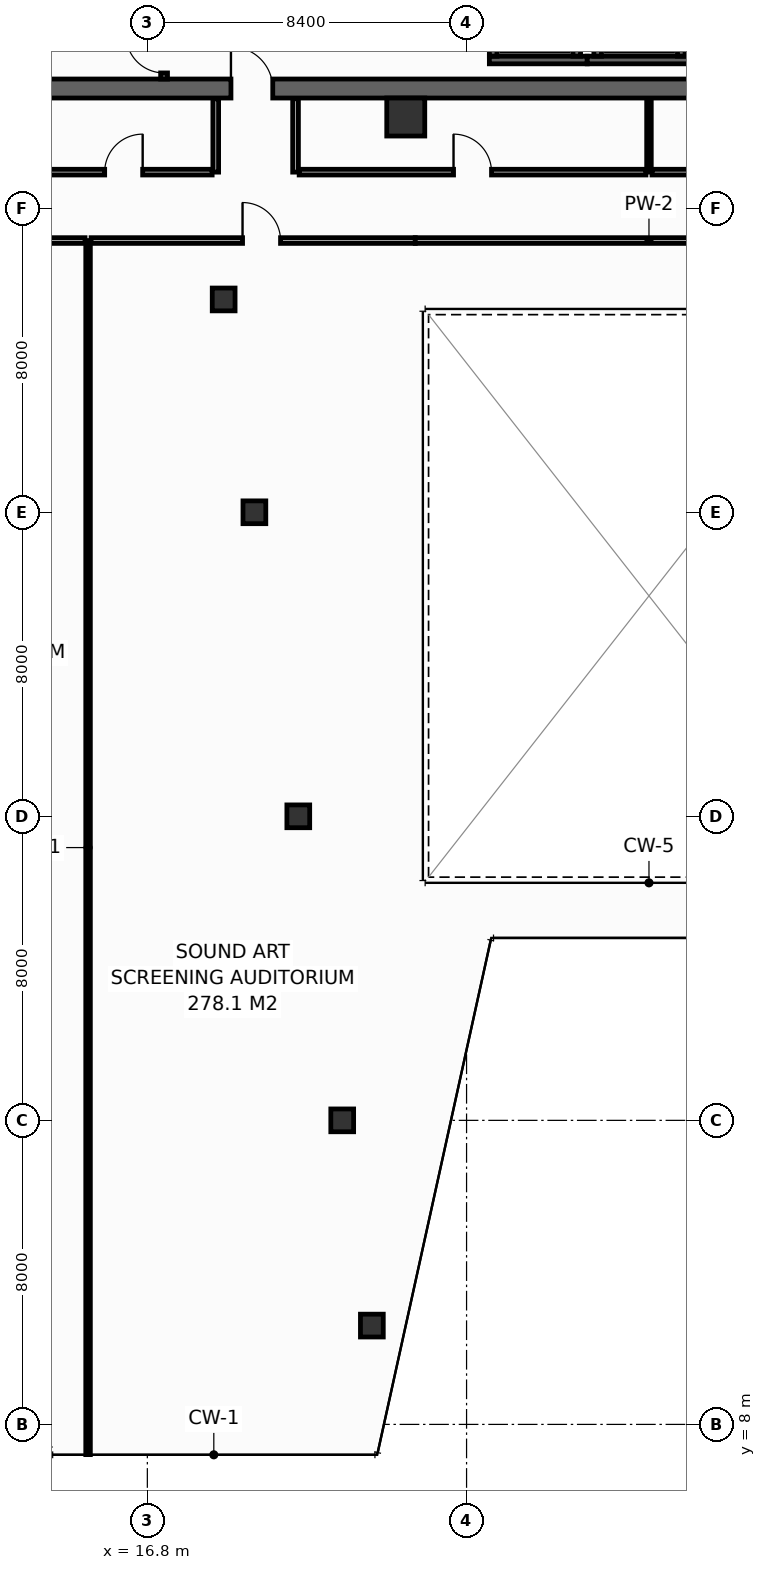
"""IFC4 building model, lengths in metres.
Left out: names, types, materials, properties, quantities, classifications, styles, units other than length and angle.
Written with IfcOpenShell. Run it as: python <this file> out.ifc"""

import sys

from ifc_helpers import new_model, si_unit, direction, frame, frame_2d, origin, origin_2d, place, context, subcontext, project, spatial, rectangle, hollow_rectangle, extrude, element, fill, save


model = new_model("IFC4")
c1 = context("Model", 3, precision=1e-05, world=origin(), true_north=direction((0.0, 1.0)))
c2 = subcontext(c1, "Body", "Model", "MODEL_VIEW")
j1 = project(units=[si_unit("LENGTHUNIT", "METRE"), si_unit("PLANEANGLEUNIT", "RADIAN")], contexts=[c1])
p1 = place(None, origin())
s1 = spatial("IfcSite", under=j1, at=p1, CompositionType="ELEMENT")
p2 = place(p1, origin())
s2 = spatial("IfcBuilding", under=s1, at=p2, CompositionType="ELEMENT")
p3 = place(p2, frame((0.0, 0.0, 141.0)))
s3 = spatial("IfcBuildingStorey", under=s2, at=p3, CompositionType="ELEMENT", Elevation=141.0)
p4 = place(p3, frame((13.6, 43.15, 0.0), z_axis=(0.0, 0.0, 1.0), x_axis=(1.0, 0.0, 0.0)))
e1 = element("IfcWall", 1, at=p4, inside=s3, PredefinedType="SHEAR", context=c2, shape_type="SweptSolid", body=[
    extrude(rectangle(XDim=32.7, YDim=0.5, at=frame_2d((16.35, 0.0))), origin(), (0.0, 0.0, 1.0), 3.55),
])
p5 = place(p4, frame((5.4, 0.0, 0.0)))
e2 = element("IfcOpeningElement", 2, at=p5, cuts=e1, PredefinedType="OPENING", context=c2, shape_type="SweptSolid", body=[
    extrude(rectangle(XDim=1.1, YDim=2.15, at=frame_2d((0.55, 1.075))), frame((0.0, 0.26, 0.0), z_axis=(0.0, -1.0, 0.0), x_axis=(1.0, 0.0, 0.0)), (0.0, 0.0, 1.0), 0.52),
])
p6 = place(p4, frame((25.6, 0.0, 0.0)))
e3 = element("IfcOpeningElement", 3, at=p6, cuts=e1, PredefinedType="OPENING", context=c2, shape_type="SweptSolid", body=[
    extrude(rectangle(XDim=1.1, YDim=2.15, at=frame_2d((0.55, 1.075))), frame((0.0, 0.26, 0.0), z_axis=(0.0, -1.0, 0.0), x_axis=(1.0, 0.0, 0.0)), (0.0, 0.0, 1.0), 0.52),
])
p7 = place(p3, frame((23.6, 42.4, 0.0), z_axis=(0.0, 0.0, 1.0), x_axis=(1.0, 0.0, 0.0)))
e4 = element("IfcColumn", 4, at=p7, inside=s3, PredefinedType="COLUMN", context=c2, shape_type="SweptSolid", body=[
    extrude(hollow_rectangle(XDim=1.0, YDim=1.0, WallThickness=0.045, at=origin_2d()), origin(), (0.0, 0.0, 1.0), 3.8),
])
for number, where, z_axis, x_axis in (
    (5, (22.708, 10.6, 0.0), (0.0, 0.0, 1.0), (1.0, 0.0, 0.0)),
    (6, (21.928, 16.0, 0.0), (0.0, 0.0, 1.0), (1.0, 0.0, 0.0)),
    (7, (20.772, 24.0, 0.0), (0.0, 0.0, 1.0), (1.0, 0.0, 0.0)),
    (8, (19.617, 32.0, 0.0), (0.0, 0.0, 1.0), (1.0, 0.0, 0.0)),
    (9, (18.808, 37.6, 0.0), (0.0, 0.0, 1.0), (1.0, 0.0, 0.0)),
):
    element("IfcColumn", number, at=place(p3, frame(where, z_axis=z_axis, x_axis=x_axis)), inside=s3, PredefinedType="COLUMN", context=c2, shape_type="SweptSolid", body=[
        extrude(hollow_rectangle(XDim=0.6, YDim=0.6, WallThickness=0.028, at=origin_2d()), origin(), (0.0, 0.0, 1.0), 3.8),
    ])
p8 = place(p3, frame((25.8, 43.9, 0.0), z_axis=(0.0, 0.0, 1.0), x_axis=(1.0, 0.0, 0.0)))
e10 = element("IfcWall", 10, at=p8, inside=s3, PredefinedType="SHEAR", context=c2, shape_type="SweptSolid", body=[
    extrude(rectangle(XDim=2.575, YDim=0.2, at=frame_2d((1.288, 0.0))), origin(), (0.0, 0.0, 1.0), 3.55),
])
for number, where, z_axis, x_axis in (
    (11, (25.9, 44.0, 0.0), (0.0, 0.0, 1.0), (0.0, 1.0, 0.0)),
    (12, (28.1, 44.0, 0.0), (0.0, 0.0, 1.0), (0.0, 1.0, 0.0)),
):
    element("IfcWall", number, at=place(p3, frame(where, z_axis=z_axis, x_axis=x_axis)), inside=s3, PredefinedType="SHEAR", context=c2, shape_type="SweptSolid", body=[
        extrude(rectangle(XDim=2.3, YDim=0.2, at=frame_2d((1.15, 0.0))), origin(), (0.0, 0.0, 1.0), 3.55),
    ])
p9 = place(p3, frame((28.375, 43.9, 0.0), z_axis=(0.0, 0.0, 1.0), x_axis=(1.0, 0.0, 0.0)))
e13 = element("IfcWall", 13, at=p9, inside=s3, PredefinedType="SHEAR", context=c2, shape_type="SweptSolid", body=[
    extrude(rectangle(XDim=2.75, YDim=0.2, at=frame_2d((1.375, 0.0))), origin(), (0.0, 0.0, 1.0), 3.55),
])
for number, where, z_axis, x_axis in (
    (14, (28.65, 44.0, 0.0), (0.0, 0.0, 1.0), (0.0, 1.0, 0.0)),
    (15, (30.85, 44.0, 0.0), (0.0, 0.0, 1.0), (0.0, 1.0, 0.0)),
):
    element("IfcWall", number, at=place(p3, frame(where, z_axis=z_axis, x_axis=x_axis)), inside=s3, PredefinedType="SHEAR", context=c2, shape_type="SweptSolid", body=[
        extrude(rectangle(XDim=2.3, YDim=0.2, at=frame_2d((1.15, 0.0))), origin(), (0.0, 0.0, 1.0), 3.55),
    ])
p10 = place(p3, frame((17.24, 43.4, 0.0), z_axis=(0.0, 0.0, 1.0), x_axis=(0.0, 1.0, 0.0)))
e16 = element("IfcWall", 16, at=p10, inside=s3, PredefinedType="SHEAR", context=c2, shape_type="SweptSolid", body=[
    extrude(rectangle(XDim=10.4, YDim=0.18, at=frame_2d((5.2, 0.0))), origin(), (0.0, 0.0, 1.0), 3.55),
])
p11 = place(p10, frame((0.16, 0.0, 0.0)))
e17 = element("IfcOpeningElement", 17, at=p11, cuts=e16, PredefinedType="OPENING", context=c2, shape_type="SweptSolid", body=[
    extrude(rectangle(XDim=1.0, YDim=2.15, at=frame_2d((0.5, 1.075))), frame((0.0, 0.1, 0.0), z_axis=(0.0, -1.0, 0.0), x_axis=(1.0, 0.0, 0.0)), (0.0, 0.0, 1.0), 0.2),
])
for number, where, z_axis, x_axis in (
    (18, (18.6, 40.95, 0.0), (0.0, 0.0, 1.0), (0.0, 1.0, 0.0)),
    (19, (20.7, 40.95, 0.0), (0.0, 0.0, 1.0), (0.0, 1.0, 0.0)),
):
    element("IfcWall", number, at=place(p3, frame(where, z_axis=z_axis, x_axis=x_axis)), inside=s3, PredefinedType="PARTITIONING", context=c2, shape_type="SweptSolid", body=[
        extrude(rectangle(XDim=1.93, YDim=0.15, at=frame_2d((0.965, 0.0))), origin(), (0.0, 0.0, 1.0), 3.55),
    ])
p12 = place(p3, frame((13.85, 40.95, 0.0), z_axis=(0.0, 0.0, 1.0), x_axis=(1.0, 0.0, 0.0)))
e20 = element("IfcWall", 20, at=p12, inside=s3, PredefinedType="PARTITIONING", context=c2, shape_type="SweptSolid", body=[
    extrude(rectangle(XDim=4.655, YDim=0.15, at=frame_2d((2.327, 0.0))), origin(), (0.0, 0.0, 1.0), 3.55),
])
p13 = place(p12, frame((1.827, 0.0, 0.0)))
e21 = element("IfcOpeningElement", 21, at=p13, cuts=e20, PredefinedType="OPENING", context=c2, shape_type="SweptSolid", body=[
    extrude(rectangle(XDim=1.0, YDim=2.15, at=frame_2d((0.5, 1.075))), frame((0.0, 0.085, 0.0), z_axis=(0.0, -1.0, 0.0), x_axis=(1.0, 0.0, 0.0)), (0.0, 0.0, 1.0), 0.17),
])
p14 = place(p3, frame((30.0, 40.95, 0.0), z_axis=(0.0, 0.0, 1.0), x_axis=(0.0, 1.0, 0.0)))
e22 = element("IfcWall", 22, at=p14, inside=s3, PredefinedType="PARTITIONING", context=c2, shape_type="SweptSolid", body=[
    extrude(rectangle(XDim=1.93, YDim=0.12, at=frame_2d((0.965, 0.0))), origin(), (0.0, 0.0, 1.0), 2.835),
])
p15 = place(p3, frame((20.795, 40.95, 0.0), z_axis=(0.0, 0.0, 1.0), x_axis=(1.0, 0.0, 0.0)))
e23 = element("IfcWall", 23, at=p15, inside=s3, PredefinedType="PARTITIONING", context=c2, shape_type="SweptSolid", body=[
    extrude(rectangle(XDim=9.125, YDim=0.15, at=frame_2d((4.562, 0.0))), origin(), (0.0, 0.0, 1.0), 2.835),
])
p16 = place(p15, frame((4.062, 0.0, 0.0)))
e24 = element("IfcOpeningElement", 24, at=p16, cuts=e23, PredefinedType="OPENING", context=c2, shape_type="SweptSolid", body=[
    extrude(rectangle(XDim=1.0, YDim=2.15, at=frame_2d((0.5, 1.075))), frame((0.0, 0.085, 0.0), z_axis=(0.0, -1.0, 0.0), x_axis=(1.0, 0.0, 0.0)), (0.0, 0.0, 1.0), 0.17),
])
p17 = place(p3, frame((30.08, 40.95, 0.0), z_axis=(0.0, 0.0, 1.0), x_axis=(1.0, 0.0, 0.0)))
e25 = element("IfcWall", 25, at=p17, inside=s3, PredefinedType="PARTITIONING", context=c2, shape_type="SweptSolid", body=[
    extrude(rectangle(XDim=8.625, YDim=0.15, at=frame_2d((4.312, 0.0))), origin(), (0.0, 0.0, 1.0), 2.835),
])
p18 = place(p17, frame((3.788, 0.0, 0.0)))
e26 = element("IfcOpeningElement", 26, at=p18, cuts=e25, PredefinedType="OPENING", context=c2, shape_type="SweptSolid", body=[
    extrude(rectangle(XDim=1.05, YDim=2.15, at=frame_2d((0.525, 1.075))), frame((0.0, 0.085, 0.0), z_axis=(0.0, -1.0, 0.0), x_axis=(1.0, 0.0, 0.0)), (0.0, 0.0, 1.0), 0.17),
])
p19 = place(p3, frame((15.24, 7.205, 0.0), z_axis=(0.0, 0.0, 1.0), x_axis=(0.0, 1.0, 0.0)))
e27 = element("IfcWall", 27, at=p19, inside=s3, PredefinedType="PARTITIONING", context=c2, shape_type="SweptSolid", body=[
    extrude(rectangle(XDim=31.945, YDim=0.12, at=frame_2d((15.972, 0.0))), origin(), (0.0, 0.0, 1.0), 2.835),
])
p20 = place(p3, frame((6.334, 39.15, 0.0), z_axis=(0.0, 0.0, 1.0), x_axis=(1.0, 0.0, 0.0)))
e28 = element("IfcWall", 28, at=p20, inside=s3, PredefinedType="PARTITIONING", context=c2, shape_type="SweptSolid", body=[
    extrude(rectangle(XDim=8.826, YDim=0.15, at=frame_2d((4.413, 0.0))), origin(), (0.0, 0.0, 1.0), 3.035),
])
p21 = place(p20, frame((3.913, 0.0, 0.0)))
e29 = element("IfcOpeningElement", 29, at=p21, cuts=e28, PredefinedType="OPENING", context=c2, shape_type="SweptSolid", body=[
    extrude(rectangle(XDim=1.0, YDim=2.15, at=frame_2d((0.5, 1.075))), frame((0.0, 0.085, 0.0), z_axis=(0.0, -1.0, 0.0), x_axis=(1.0, 0.0, 0.0)), (0.0, 0.0, 1.0), 0.17),
])
p22 = place(p3, frame((15.32, 39.15, 0.0), z_axis=(0.0, 0.0, 1.0), x_axis=(1.0, 0.0, 0.0)))
e30 = element("IfcWall", 30, at=p22, inside=s3, PredefinedType="PARTITIONING", context=c2, shape_type="SweptSolid", body=[
    extrude(rectangle(XDim=8.53, YDim=0.15, at=frame_2d((4.265, 0.0))), origin(), (0.0, 0.0, 1.0), 2.835),
])
p23 = place(p22, frame((3.985, 0.0, 0.0)))
e31 = element("IfcOpeningElement", 31, at=p23, cuts=e30, PredefinedType="OPENING", context=c2, shape_type="SweptSolid", body=[
    extrude(rectangle(XDim=1.0, YDim=2.15, at=frame_2d((0.5, 1.075))), frame((0.0, 0.085, 0.0), z_axis=(0.0, -1.0, 0.0), x_axis=(1.0, 0.0, 0.0)), (0.0, 0.0, 1.0), 0.17),
])
p24 = place(p3, frame((23.85, 39.15, 0.0), z_axis=(0.0, 0.0, 1.0), x_axis=(1.0, 0.0, 0.0)))
e32 = element("IfcWall", 32, at=p24, inside=s3, PredefinedType="PARTITIONING", context=c2, shape_type="SweptSolid", body=[
    extrude(rectangle(XDim=12.3, YDim=0.15, at=frame_2d((6.15, 0.0))), origin(), (0.0, 0.0, 1.0), 3.55),
])
p25 = place(p11, origin())
e33 = element("IfcDoor", 33, at=p25, inside=s3, OperationType="SINGLE_SWING_RIGHT", PredefinedType="DOOR", context=c2, shape_type="SweptSolid", body=[
    extrude(rectangle(XDim=1.0, YDim=2.15, at=frame_2d((0.5, 1.075))), frame((0.0, 0.025, 0.0), z_axis=(0.0, -1.0, 0.0), x_axis=(1.0, 0.0, 0.0)), (0.0, 0.0, 1.0), 0.05),
])
fill(e17, e33)
p26 = place(p5, origin())
e34 = element("IfcDoor", 34, at=p26, inside=s3, OperationType="SINGLE_SWING_LEFT", PredefinedType="DOOR", context=c2, shape_type="SweptSolid", body=[
    extrude(rectangle(XDim=1.1, YDim=2.15, at=frame_2d((0.55, 1.075))), frame((0.0, 0.025, 0.0), z_axis=(0.0, -1.0, 0.0), x_axis=(1.0, 0.0, 0.0)), (0.0, 0.0, 1.0), 0.05),
])
fill(e2, e34)
p27 = place(p13, origin())
e35 = element("IfcDoor", 35, at=p27, inside=s3, OperationType="SINGLE_SWING_RIGHT", PredefinedType="DOOR", context=c2, shape_type="SweptSolid", body=[
    extrude(rectangle(XDim=1.0, YDim=2.15, at=frame_2d((0.5, 1.075))), frame((0.0, 0.025, 0.0), z_axis=(0.0, -1.0, 0.0), x_axis=(1.0, 0.0, 0.0)), (0.0, 0.0, 1.0), 0.05),
])
fill(e21, e35)
p28 = place(p16, origin())
e36 = element("IfcDoor", 36, at=p28, inside=s3, OperationType="SINGLE_SWING_LEFT", PredefinedType="DOOR", context=c2, shape_type="SweptSolid", body=[
    extrude(rectangle(XDim=1.0, YDim=2.15, at=frame_2d((0.5, 1.075))), frame((0.0, 0.025, 0.0), z_axis=(0.0, -1.0, 0.0), x_axis=(1.0, 0.0, 0.0)), (0.0, 0.0, 1.0), 0.05),
])
fill(e24, e36)
p29 = place(p23, origin())
e37 = element("IfcDoor", 37, at=p29, inside=s3, OperationType="SINGLE_SWING_LEFT", PredefinedType="DOOR", context=c2, shape_type="SweptSolid", body=[
    extrude(rectangle(XDim=1.0, YDim=2.15, at=frame_2d((0.5, 1.075))), frame((0.0, 0.025, 0.0), z_axis=(0.0, -1.0, 0.0), x_axis=(1.0, 0.0, 0.0)), (0.0, 0.0, 1.0), 0.05),
])
fill(e31, e37)
save(model, sys.argv[1])
